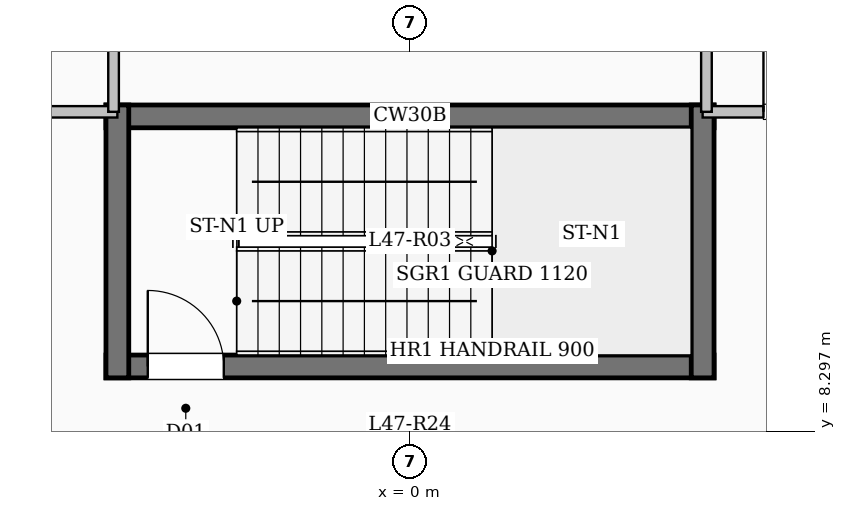
"""IFC4 building model, lengths in metres.
Left out: names, types, materials, properties, quantities, classifications, styles, units other than length and angle.
Written with IfcOpenShell. Run it as: python <this file> out.ifc"""

import sys

from ifc_helpers import new_model, si_unit, direction, frame, frame_2d, origin, place, context, subcontext, project, spatial, rectangle, extrude, element, fill, save


model = new_model("IFC4")
c1 = context("Model", 3, precision=1e-05, world=origin(), true_north=direction((0.0, 1.0)))
c2 = subcontext(c1, "Body", "Model", "MODEL_VIEW")
j1 = project(units=[si_unit("LENGTHUNIT", "METRE"), si_unit("PLANEANGLEUNIT", "RADIAN")], contexts=[c1])
p1 = place(None, origin())
s1 = spatial("IfcSite", under=j1, at=p1, CompositionType="ELEMENT")
p2 = place(p1, origin())
s2 = spatial("IfcBuilding", under=s1, at=p2, CompositionType="ELEMENT")
p3 = place(p2, frame((0.0, 0.0, 172.8)))
s3 = spatial("IfcBuildingStorey", under=s2, at=p3, CompositionType="ELEMENT", Elevation=172.8)
p4 = place(p3, frame((-4.0, 12.44, 0.0), z_axis=(0.0, 0.0, 1.0), x_axis=(1.0, 0.0, 0.0)))
e1 = element("IfcWall", 1, at=p4, inside=s3, PredefinedType="SHEAR", context=c2, shape_type="SweptSolid", body=[
    extrude(rectangle(XDim=8.0, YDim=0.3, at=frame_2d((4.0, 0.0))), origin(), (0.0, 0.0, 1.0), 4.5),
])
p5 = place(p3, frame((-4.0, 9.15, 0.0), z_axis=(0.0, 0.0, 1.0), x_axis=(1.0, 0.0, 0.0)))
e2 = element("IfcWall", 2, at=p5, inside=s3, PredefinedType="SHEAR", context=c2, shape_type="SweptSolid", body=[
    extrude(rectangle(XDim=8.0, YDim=0.3, at=frame_2d((4.0, 0.0))), origin(), (0.0, 0.0, 1.0), 4.5),
])
p6 = place(p5, frame((0.55, 0.0, 0.0)))
e3 = element("IfcOpeningElement", 3, at=p6, cuts=e2, PredefinedType="OPENING", context=c2, shape_type="SweptSolid", body=[
    extrude(rectangle(XDim=1.0, YDim=2.15, at=frame_2d((0.5, 1.075))), frame((0.0, 0.16, 0.0), z_axis=(0.0, -1.0, 0.0), x_axis=(1.0, 0.0, 0.0)), (0.0, 0.0, 1.0), 0.32),
])
for number, where, z_axis, x_axis in (
    (4, (-3.85, 9.0, 0.0), (0.0, 0.0, 1.0), (0.0, 1.0, 0.0)),
    (5, (3.85, 9.0, 0.0), (0.0, 0.0, 1.0), (0.0, 1.0, 0.0)),
):
    element("IfcWall", number, at=place(p3, frame(where, z_axis=z_axis, x_axis=x_axis)), inside=s3, PredefinedType="SHEAR", context=c2, shape_type="SweptSolid", body=[
        extrude(rectangle(XDim=3.59, YDim=0.3, at=frame_2d((1.795, 0.0))), origin(), (0.0, 0.0, 1.0), 4.5),
    ])
p7 = place(p3, frame((-19.55, 12.5, 0.0), z_axis=(0.0, 0.0, 1.0), x_axis=(1.0, 0.0, 0.0)))
e6 = element("IfcWall", 6, at=p7, inside=s3, PredefinedType="PARTITIONING", context=c2, shape_type="SweptSolid", body=[
    extrude(rectangle(XDim=15.7, YDim=0.15, at=frame_2d((7.85, 0.0))), origin(), (0.0, 0.0, 1.0), 4.2),
])
p8 = place(p7, frame((0.65, 0.0, 0.0)))
e7 = element("IfcOpeningElement", 7, at=p8, cuts=e6, PredefinedType="OPENING", context=c2, shape_type="SweptSolid", body=[
    extrude(rectangle(XDim=0.95, YDim=2.15, at=frame_2d((0.475, 1.075))), frame((0.0, 0.085, 0.0), z_axis=(0.0, -1.0, 0.0), x_axis=(1.0, 0.0, 0.0)), (0.0, 0.0, 1.0), 0.17),
])
p9 = place(p7, frame((4.55, 0.0, 0.0)))
e8 = element("IfcOpeningElement", 8, at=p9, cuts=e6, PredefinedType="OPENING", context=c2, shape_type="SweptSolid", body=[
    extrude(rectangle(XDim=0.95, YDim=2.15, at=frame_2d((0.475, 1.075))), frame((0.0, 0.085, 0.0), z_axis=(0.0, -1.0, 0.0), x_axis=(1.0, 0.0, 0.0)), (0.0, 0.0, 1.0), 0.17),
])
p10 = place(p7, frame((8.45, 0.0, 0.0)))
e9 = element("IfcOpeningElement", 9, at=p10, cuts=e6, PredefinedType="OPENING", context=c2, shape_type="SweptSolid", body=[
    extrude(rectangle(XDim=0.95, YDim=2.15, at=frame_2d((0.475, 1.075))), frame((0.0, 0.085, 0.0), z_axis=(0.0, -1.0, 0.0), x_axis=(1.0, 0.0, 0.0)), (0.0, 0.0, 1.0), 0.17),
])
p11 = place(p7, frame((12.35, 0.0, 0.0)))
e10 = element("IfcOpeningElement", 10, at=p11, cuts=e6, PredefinedType="OPENING", context=c2, shape_type="SweptSolid", body=[
    extrude(rectangle(XDim=0.95, YDim=2.15, at=frame_2d((0.475, 1.075))), frame((0.0, 0.085, 0.0), z_axis=(0.0, -1.0, 0.0), x_axis=(1.0, 0.0, 0.0)), (0.0, 0.0, 1.0), 0.17),
])
p12 = place(p3, frame((3.85, 12.5, 0.0), z_axis=(0.0, 0.0, 1.0), x_axis=(1.0, 0.0, 0.0)))
e11 = element("IfcWall", 11, at=p12, inside=s3, PredefinedType="PARTITIONING", context=c2, shape_type="SweptSolid", body=[
    extrude(rectangle(XDim=15.7, YDim=0.15, at=frame_2d((7.85, 0.0))), origin(), (0.0, 0.0, 1.0), 4.2),
])
p13 = place(p12, frame((0.8, 0.0, 0.0)))
e12 = element("IfcOpeningElement", 12, at=p13, cuts=e11, PredefinedType="OPENING", context=c2, shape_type="SweptSolid", body=[
    extrude(rectangle(XDim=0.95, YDim=2.15, at=frame_2d((0.475, 1.075))), frame((0.0, 0.085, 0.0), z_axis=(0.0, -1.0, 0.0), x_axis=(1.0, 0.0, 0.0)), (0.0, 0.0, 1.0), 0.17),
])
p14 = place(p12, frame((3.6, 0.0, 0.0)))
e13 = element("IfcOpeningElement", 13, at=p14, cuts=e11, PredefinedType="OPENING", context=c2, shape_type="SweptSolid", body=[
    extrude(rectangle(XDim=0.95, YDim=2.15, at=frame_2d((0.475, 1.075))), frame((0.0, 0.085, 0.0), z_axis=(0.0, -1.0, 0.0), x_axis=(1.0, 0.0, 0.0)), (0.0, 0.0, 1.0), 0.17),
])
p15 = place(p12, frame((6.55, 0.0, 0.0)))
e14 = element("IfcOpeningElement", 14, at=p15, cuts=e11, PredefinedType="OPENING", context=c2, shape_type="SweptSolid", body=[
    extrude(rectangle(XDim=1.08, YDim=2.15, at=frame_2d((0.54, 1.075))), frame((0.0, 0.085, 0.0), z_axis=(0.0, -1.0, 0.0), x_axis=(1.0, 0.0, 0.0)), (0.0, 0.0, 1.0), 0.17),
])
p16 = place(p12, frame((10.77, 0.0, 0.0)))
e15 = element("IfcOpeningElement", 15, at=p16, cuts=e11, PredefinedType="OPENING", context=c2, shape_type="SweptSolid", body=[
    extrude(rectangle(XDim=1.2, YDim=2.15, at=frame_2d((0.6, 1.075))), frame((0.0, 0.085, 0.0), z_axis=(0.0, -1.0, 0.0), x_axis=(1.0, 0.0, 0.0)), (0.0, 0.0, 1.0), 0.17),
])
for number, where, z_axis, x_axis in (
    (16, (-3.9, 12.5, 0.0), (0.0, 0.0, 1.0), (0.0, 1.0, 0.0)),
    (17, (3.9, 12.5, 0.0), (0.0, 0.0, 1.0), (0.0, 1.0, 0.0)),
):
    element("IfcWall", number, at=place(p3, frame(where, z_axis=z_axis, x_axis=x_axis)), inside=s3, PredefinedType="PARTITIONING", context=c2, shape_type="SweptSolid", body=[
        extrude(rectangle(XDim=10.18, YDim=0.14, at=frame_2d((5.09, 0.0))), origin(), (0.0, 0.0, 1.0), 4.2),
    ])
p17 = place(p6, origin())
e18 = element("IfcDoor", 18, at=p17, inside=s3, OperationType="SINGLE_SWING_LEFT", PredefinedType="DOOR", context=c2, shape_type="SweptSolid", body=[
    extrude(rectangle(XDim=1.0, YDim=2.15, at=frame_2d((0.5, 1.075))), frame((0.0, 0.025, 0.0), z_axis=(0.0, -1.0, 0.0), x_axis=(1.0, 0.0, 0.0)), (0.0, 0.0, 1.0), 0.05),
])
fill(e3, e18)
p18 = place(p13, origin())
e19 = element("IfcDoor", 19, at=p18, inside=s3, OperationType="SINGLE_SWING_LEFT", PredefinedType="DOOR", context=c2, shape_type="SweptSolid", body=[
    extrude(rectangle(XDim=0.95, YDim=2.15, at=frame_2d((0.475, 1.075))), frame((0.0, 0.025, 0.0), z_axis=(0.0, -1.0, 0.0), x_axis=(1.0, 0.0, 0.0)), (0.0, 0.0, 1.0), 0.05),
])
fill(e12, e19)
save(model, sys.argv[1])
